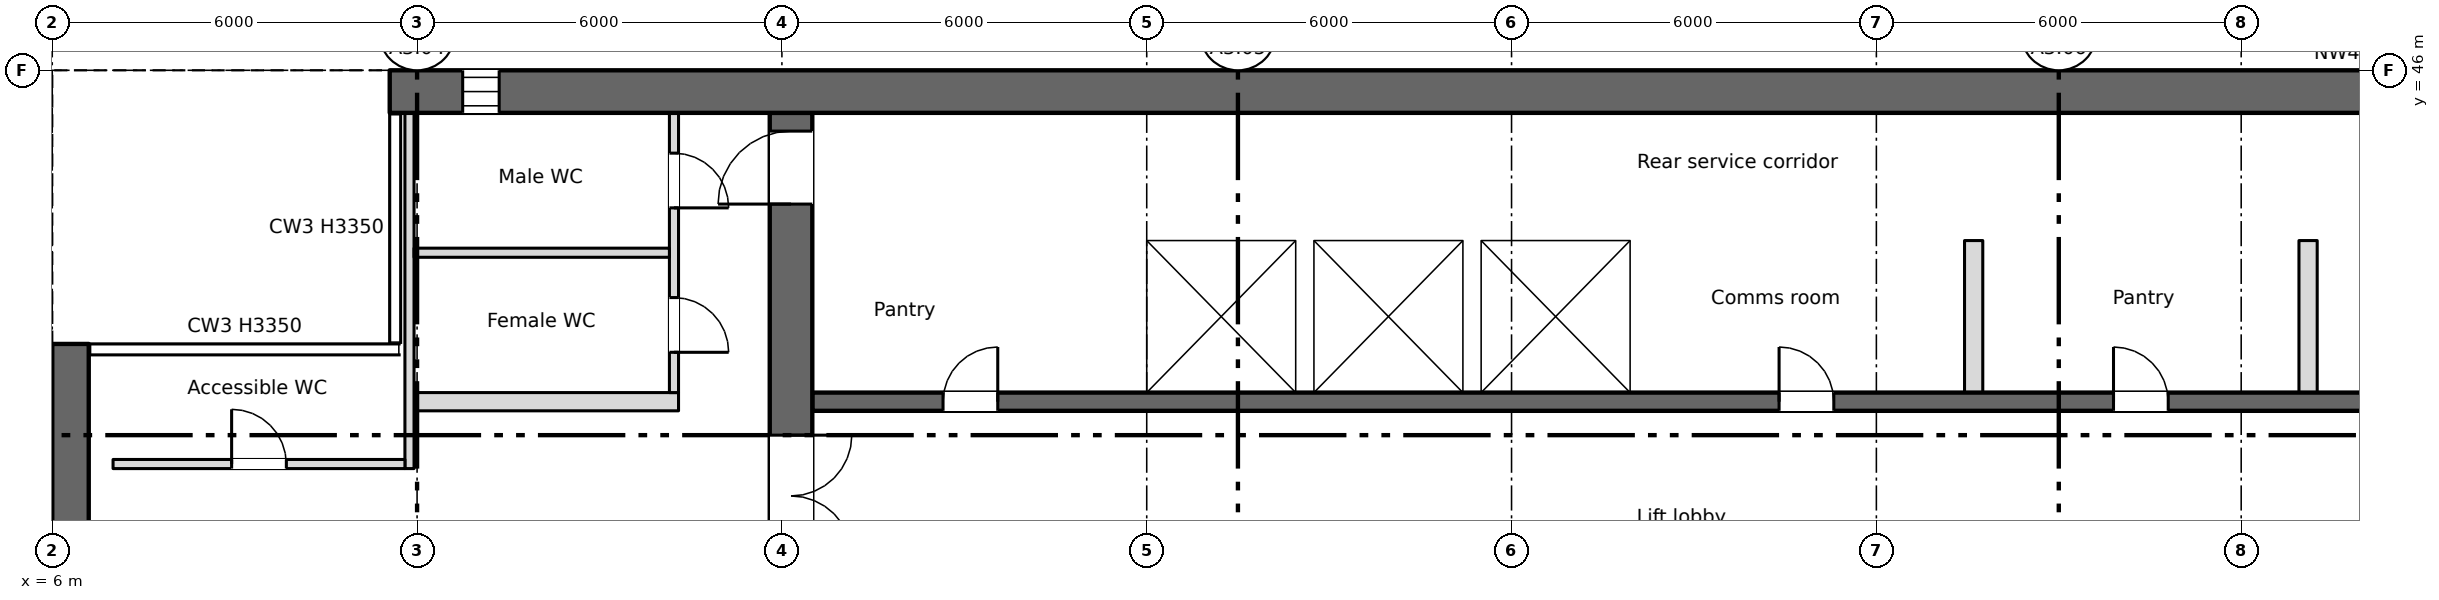
"""IFC4 building model, lengths in metres.
Left out: names, types, materials, properties, quantities, classifications, styles, units other than length and angle.
Written with IfcOpenShell. Run it as: python <this file> out.ifc"""

import sys

from ifc_helpers import new_model, si_unit, direction, frame, frame_2d, origin, place, context, subcontext, project, spatial, rectangle, extrude, element, fill, save


model = new_model("IFC4")
c1 = context("Model", 3, precision=1e-05, world=origin(), true_north=direction((0.0, 1.0)))
c2 = subcontext(c1, "Body", "Model", "MODEL_VIEW")
j1 = project(units=[si_unit("LENGTHUNIT", "METRE"), si_unit("PLANEANGLEUNIT", "RADIAN")], contexts=[c1])
p1 = place(None, origin())
s1 = spatial("IfcSite", under=j1, at=p1, CompositionType="ELEMENT")
p2 = place(p1, origin())
s2 = spatial("IfcBuilding", under=s1, at=p2, CompositionType="ELEMENT")
p3 = place(p2, frame((0.0, 0.0, 200.5)))
s3 = spatial("IfcBuildingStorey", under=s2, at=p3, CompositionType="ELEMENT", Elevation=200.5)
p4 = place(p3, frame((6.3, 7.5, 0.0), z_axis=(0.0, 0.0, 1.0), x_axis=(0.0, 1.0, 0.0)))
e1 = element("IfcWall", 1, at=p4, inside=s3, PredefinedType="SHEAR", context=c2, shape_type="SweptSolid", body=[
    extrude(rectangle(XDim=34.0, YDim=0.6, at=frame_2d((17.0, 0.0))), origin(), (0.0, 0.0, 1.0), 3.35),
])
p5 = place(p4, frame((1.2, 0.0, 0.6)))
e2 = element("IfcOpeningElement", 2, at=p5, cuts=e1, PredefinedType="OPENING", context=c2, shape_type="SweptSolid", body=[
    extrude(rectangle(XDim=0.6, YDim=2.4, at=frame_2d((0.3, 1.2))), frame((0.0, 0.31, 0.0), z_axis=(0.0, -1.0, 0.0), x_axis=(1.0, 0.0, 0.0)), (0.0, 0.0, 1.0), 0.62),
])
p6 = place(p4, frame((7.2, 0.0, 0.6)))
e3 = element("IfcOpeningElement", 3, at=p6, cuts=e1, PredefinedType="OPENING", context=c2, shape_type="SweptSolid", body=[
    extrude(rectangle(XDim=0.6, YDim=2.4, at=frame_2d((0.3, 1.2))), frame((0.0, 0.31, 0.0), z_axis=(0.0, -1.0, 0.0), x_axis=(1.0, 0.0, 0.0)), (0.0, 0.0, 1.0), 0.62),
])
p7 = place(p4, frame((13.2, 0.0, 0.6)))
e4 = element("IfcOpeningElement", 4, at=p7, cuts=e1, PredefinedType="OPENING", context=c2, shape_type="SweptSolid", body=[
    extrude(rectangle(XDim=0.6, YDim=2.4, at=frame_2d((0.3, 1.2))), frame((0.0, 0.31, 0.0), z_axis=(0.0, -1.0, 0.0), x_axis=(1.0, 0.0, 0.0)), (0.0, 0.0, 1.0), 0.62),
])
p8 = place(p4, frame((19.2, 0.0, 0.6)))
e5 = element("IfcOpeningElement", 5, at=p8, cuts=e1, PredefinedType="OPENING", context=c2, shape_type="SweptSolid", body=[
    extrude(rectangle(XDim=0.6, YDim=2.4, at=frame_2d((0.3, 1.2))), frame((0.0, 0.31, 0.0), z_axis=(0.0, -1.0, 0.0), x_axis=(1.0, 0.0, 0.0)), (0.0, 0.0, 1.0), 0.62),
])
p9 = place(p3, frame((11.55, 45.65, 0.0), z_axis=(0.0, 0.0, 1.0), x_axis=(1.0, 0.0, 0.0)))
e6 = element("IfcWall", 6, at=p9, inside=s3, PredefinedType="SHEAR", context=c2, shape_type="SweptSolid", body=[
    extrude(rectangle(XDim=54.9, YDim=0.7, at=frame_2d((27.45, 0.0))), origin(), (0.0, 0.0, 1.0), 3.35),
])
p10 = place(p9, frame((1.2, 0.0, 0.6)))
e7 = element("IfcOpeningElement", 7, at=p10, cuts=e6, PredefinedType="OPENING", context=c2, shape_type="SweptSolid", body=[
    extrude(rectangle(XDim=0.6, YDim=2.4, at=frame_2d((0.3, 1.2))), frame((0.0, 0.36, 0.0), z_axis=(0.0, -1.0, 0.0), x_axis=(1.0, 0.0, 0.0)), (0.0, 0.0, 1.0), 0.72),
])
p11 = place(p3, frame((6.8, 28.4, 0.0), z_axis=(0.0, 0.0, 1.0), x_axis=(0.0, 1.0, 0.0)))
e8 = element("IfcWall", 8, at=p11, inside=s3, PredefinedType="SHEAR", context=c2, shape_type="SweptSolid", body=[
    extrude(rectangle(XDim=12.85, YDim=0.4, at=frame_2d((6.425, 0.0))), origin(), (0.0, 0.0, 1.0), 3.35),
])
p12 = place(p3, frame((18.15, 28.4, 0.0), z_axis=(0.0, 0.0, 1.0), x_axis=(0.0, 1.0, 0.0)))
e9 = element("IfcWall", 9, at=p12, inside=s3, PredefinedType="SHEAR", context=c2, shape_type="SweptSolid", body=[
    extrude(rectangle(XDim=16.9, YDim=0.7, at=frame_2d((8.45, 0.0))), origin(), (0.0, 0.0, 1.0), 3.35),
])
p13 = place(p12, frame((9.6, 0.0, 0.0)))
e10 = element("IfcOpeningElement", 10, at=p13, cuts=e9, PredefinedType="OPENING", context=c2, shape_type="SweptSolid", body=[
    extrude(rectangle(XDim=2.0, YDim=2.1, at=frame_2d((1.0, 1.05))), frame((0.0, 0.36, 0.0), z_axis=(0.0, -1.0, 0.0), x_axis=(1.0, 0.0, 0.0)), (0.0, 0.0, 1.0), 0.72),
])
p14 = place(p12, frame((15.4, 0.0, 0.0)))
e11 = element("IfcOpeningElement", 11, at=p14, cuts=e9, PredefinedType="OPENING", context=c2, shape_type="SweptSolid", body=[
    extrude(rectangle(XDim=1.2, YDim=2.1, at=frame_2d((0.6, 1.05))), frame((0.0, 0.36, 0.0), z_axis=(0.0, -1.0, 0.0), x_axis=(1.0, 0.0, 0.0)), (0.0, 0.0, 1.0), 0.72),
])
p15 = place(p3, frame((18.5, 40.55, 0.0), z_axis=(0.0, 0.0, 1.0), x_axis=(1.0, 0.0, 0.0)))
e12 = element("IfcWall", 12, at=p15, inside=s3, PredefinedType="SHEAR", context=c2, shape_type="SweptSolid", body=[
    extrude(rectangle(XDim=41.0, YDim=0.3, at=frame_2d((20.5, 0.0))), origin(), (0.0, 0.0, 1.0), 3.35),
])
p16 = place(p15, frame((2.15, 0.0, 0.0)))
e13 = element("IfcOpeningElement", 13, at=p16, cuts=e12, PredefinedType="OPENING", context=c2, shape_type="SweptSolid", body=[
    extrude(rectangle(XDim=0.9, YDim=2.1, at=frame_2d((0.45, 1.05))), frame((0.0, 0.16, 0.0), z_axis=(0.0, -1.0, 0.0), x_axis=(1.0, 0.0, 0.0)), (0.0, 0.0, 1.0), 0.32),
])
p17 = place(p15, frame((15.9, 0.0, 0.0)))
e14 = element("IfcOpeningElement", 14, at=p17, cuts=e12, PredefinedType="OPENING", context=c2, shape_type="SweptSolid", body=[
    extrude(rectangle(XDim=0.9, YDim=2.1, at=frame_2d((0.45, 1.05))), frame((0.0, 0.16, 0.0), z_axis=(0.0, -1.0, 0.0), x_axis=(1.0, 0.0, 0.0)), (0.0, 0.0, 1.0), 0.32),
])
p18 = place(p15, frame((21.4, 0.0, 0.0)))
e15 = element("IfcOpeningElement", 15, at=p18, cuts=e12, PredefinedType="OPENING", context=c2, shape_type="SweptSolid", body=[
    extrude(rectangle(XDim=0.9, YDim=2.1, at=frame_2d((0.45, 1.05))), frame((0.0, 0.16, 0.0), z_axis=(0.0, -1.0, 0.0), x_axis=(1.0, 0.0, 0.0)), (0.0, 0.0, 1.0), 0.32),
])
p19 = place(p15, frame((26.9, 0.0, 0.0)))
e16 = element("IfcOpeningElement", 16, at=p19, cuts=e12, PredefinedType="OPENING", context=c2, shape_type="SweptSolid", body=[
    extrude(rectangle(XDim=0.9, YDim=2.1, at=frame_2d((0.45, 1.05))), frame((0.0, 0.16, 0.0), z_axis=(0.0, -1.0, 0.0), x_axis=(1.0, 0.0, 0.0)), (0.0, 0.0, 1.0), 0.32),
])
p20 = place(p15, frame((6.175, 0.0, 0.0)))
e17 = element("IfcOpeningElement", 17, at=p20, cuts=e12, PredefinedType="OPENING", context=c2, shape_type="SweptSolid", body=[
    extrude(rectangle(XDim=1.1, YDim=2.1, at=frame_2d((0.55, 1.05))), frame((0.0, 0.16, 0.0), z_axis=(0.0, -1.0, 0.0), x_axis=(1.0, 0.0, 0.0)), (0.0, 0.0, 1.0), 0.32),
])
p21 = place(p15, frame((8.925, 0.0, 0.0)))
e18 = element("IfcOpeningElement", 18, at=p21, cuts=e12, PredefinedType="OPENING", context=c2, shape_type="SweptSolid", body=[
    extrude(rectangle(XDim=1.1, YDim=2.1, at=frame_2d((0.55, 1.05))), frame((0.0, 0.16, 0.0), z_axis=(0.0, -1.0, 0.0), x_axis=(1.0, 0.0, 0.0)), (0.0, 0.0, 1.0), 0.32),
])
p22 = place(p15, frame((11.675, 0.0, 0.0)))
e19 = element("IfcOpeningElement", 19, at=p22, cuts=e12, PredefinedType="OPENING", context=c2, shape_type="SweptSolid", body=[
    extrude(rectangle(XDim=1.1, YDim=2.1, at=frame_2d((0.55, 1.05))), frame((0.0, 0.16, 0.0), z_axis=(0.0, -1.0, 0.0), x_axis=(1.0, 0.0, 0.0)), (0.0, 0.0, 1.0), 0.32),
])
p23 = place(p15, frame((30.925, 0.0, 0.0)))
e20 = element("IfcOpeningElement", 20, at=p23, cuts=e12, PredefinedType="OPENING", context=c2, shape_type="SweptSolid", body=[
    extrude(rectangle(XDim=1.1, YDim=2.1, at=frame_2d((0.55, 1.05))), frame((0.0, 0.16, 0.0), z_axis=(0.0, -1.0, 0.0), x_axis=(1.0, 0.0, 0.0)), (0.0, 0.0, 1.0), 0.32),
])
p24 = place(p15, frame((33.675, 0.0, 0.0)))
e21 = element("IfcOpeningElement", 21, at=p24, cuts=e12, PredefinedType="OPENING", context=c2, shape_type="SweptSolid", body=[
    extrude(rectangle(XDim=1.1, YDim=2.1, at=frame_2d((0.55, 1.05))), frame((0.0, 0.16, 0.0), z_axis=(0.0, -1.0, 0.0), x_axis=(1.0, 0.0, 0.0)), (0.0, 0.0, 1.0), 0.32),
])
p25 = place(p15, frame((36.375, 0.0, 0.0)))
e22 = element("IfcOpeningElement", 22, at=p25, cuts=e12, PredefinedType="OPENING", context=c2, shape_type="SweptSolid", body=[
    extrude(rectangle(XDim=1.2, YDim=2.1, at=frame_2d((0.6, 1.05))), frame((0.0, 0.16, 0.0), z_axis=(0.0, -1.0, 0.0), x_axis=(1.0, 0.0, 0.0)), (0.0, 0.0, 1.0), 0.32),
])
p26 = place(p15, frame((39.15, 0.0, 0.0)))
e23 = element("IfcOpeningElement", 23, at=p26, cuts=e12, PredefinedType="OPENING", context=c2, shape_type="SweptSolid", body=[
    extrude(rectangle(XDim=1.2, YDim=2.1, at=frame_2d((0.6, 1.05))), frame((0.0, 0.16, 0.0), z_axis=(0.0, -1.0, 0.0), x_axis=(1.0, 0.0, 0.0)), (0.0, 0.0, 1.0), 0.32),
])
p27 = place(p3, frame((18.5, 43.35, 0.0), z_axis=(0.0, 0.0, 1.0), x_axis=(1.0, 0.0, 0.0)))
e24 = element("IfcWall", 24, at=p27, inside=s3, PredefinedType="SHEAR", context=c2, shape_type="SweptSolid", body=[
    extrude(rectangle(XDim=41.0, YDim=0.3, at=frame_2d((20.5, 0.0))), origin(), (0.0, 0.0, 1.0), 3.35),
])
p28 = place(p3, frame((11.95, 40.55, 0.0), z_axis=(0.0, 0.0, 1.0), x_axis=(1.0, 0.0, 0.0)))
e25 = element("IfcWall", 25, at=p28, inside=s3, PredefinedType="PARTITIONING", context=c2, shape_type="SweptSolid", body=[
    extrude(rectangle(XDim=4.35, YDim=0.3, at=frame_2d((2.175, 0.0))), origin(), (0.0, 0.0, 1.0), 3.35),
])
for number, where, z_axis, x_axis in (
    (26, (23.85, 40.7, 0.0), (0.0, 0.0, 1.0), (0.0, 1.0, 0.0)),
    (27, (26.6, 40.7, 0.0), (0.0, 0.0, 1.0), (0.0, 1.0, 0.0)),
    (28, (29.35, 40.7, 0.0), (0.0, 0.0, 1.0), (0.0, 1.0, 0.0)),
    (29, (32.1, 40.7, 0.0), (0.0, 0.0, 1.0), (0.0, 1.0, 0.0)),
):
    element("IfcWall", number, at=place(p3, frame(where, z_axis=z_axis, x_axis=x_axis)), inside=s3, PredefinedType="SHEAR", context=c2, shape_type="SweptSolid", body=[
        extrude(rectangle(XDim=2.5, YDim=0.3, at=frame_2d((1.25, 0.0))), origin(), (0.0, 0.0, 1.0), 3.35),
    ])
p29 = place(p3, frame((16.225, 45.3, 0.0), z_axis=(0.0, 0.0, 1.0), x_axis=(0.0, -1.0, 0.0)))
e30 = element("IfcWall", 30, at=p29, inside=s3, PredefinedType="PARTITIONING", context=c2, shape_type="SweptSolid", body=[
    extrude(rectangle(XDim=4.6, YDim=0.15, at=frame_2d((2.3, 0.0))), origin(), (0.0, 0.0, 1.0), 3.35),
])
p30 = place(p29, frame((3.038, 0.0, 0.0)))
e31 = element("IfcOpeningElement", 31, at=p30, cuts=e30, PredefinedType="OPENING", context=c2, shape_type="SweptSolid", body=[
    extrude(rectangle(XDim=0.9, YDim=2.1, at=frame_2d((0.45, 1.05))), frame((0.0, 0.085, 0.0), z_axis=(0.0, -1.0, 0.0), x_axis=(1.0, 0.0, 0.0)), (0.0, 0.0, 1.0), 0.17),
])
p31 = place(p29, frame((0.663, 0.0, 0.0)))
e32 = element("IfcOpeningElement", 32, at=p31, cuts=e30, PredefinedType="OPENING", context=c2, shape_type="SweptSolid", body=[
    extrude(rectangle(XDim=0.9, YDim=2.1, at=frame_2d((0.45, 1.05))), frame((0.0, 0.085, 0.0), z_axis=(0.0, -1.0, 0.0), x_axis=(1.0, 0.0, 0.0)), (0.0, 0.0, 1.0), 0.17),
])
p32 = place(p3, frame((11.875, 39.45, 0.0), z_axis=(0.0, 0.0, 1.0), x_axis=(0.0, 1.0, 0.0)))
e33 = element("IfcWall", 33, at=p32, inside=s3, PredefinedType="PARTITIONING", context=c2, shape_type="SweptSolid", body=[
    extrude(rectangle(XDim=5.85, YDim=0.15, at=frame_2d((2.925, 0.0))), origin(), (0.0, 0.0, 1.0), 3.35),
])
p33 = place(p3, frame((7.0, 39.525, 0.0), z_axis=(0.0, 0.0, 1.0), x_axis=(1.0, 0.0, 0.0)))
e34 = element("IfcWall", 34, at=p33, inside=s3, PredefinedType="PARTITIONING", context=c2, shape_type="SweptSolid", body=[
    extrude(rectangle(XDim=4.8, YDim=0.15, at=frame_2d((2.4, 0.0))), origin(), (0.0, 0.0, 1.0), 3.35),
])
p34 = place(p33, frame((1.95, 0.0, 0.0)))
e35 = element("IfcOpeningElement", 35, at=p34, cuts=e34, PredefinedType="OPENING", context=c2, shape_type="SweptSolid", body=[
    extrude(rectangle(XDim=0.9, YDim=2.1, at=frame_2d((0.45, 1.05))), frame((0.0, 0.085, 0.0), z_axis=(0.0, -1.0, 0.0), x_axis=(1.0, 0.0, 0.0)), (0.0, 0.0, 1.0), 0.17),
])
p35 = place(p3, frame((11.95, 43.0, 0.0), z_axis=(0.0, 0.0, 1.0), x_axis=(1.0, 0.0, 0.0)))
e36 = element("IfcWall", 36, at=p35, inside=s3, PredefinedType="PARTITIONING", context=c2, shape_type="SweptSolid", body=[
    extrude(rectangle(XDim=4.2, YDim=0.15, at=frame_2d((2.1, 0.0))), origin(), (0.0, 0.0, 1.0), 3.35),
])
for number, where, z_axis, x_axis in (
    (37, (37.6, 40.7, 0.0), (0.0, 0.0, 1.0), (0.0, 1.0, 0.0)),
    (38, (43.1, 40.7, 0.0), (0.0, 0.0, 1.0), (0.0, 1.0, 0.0)),
):
    element("IfcWall", number, at=place(p3, frame(where, z_axis=z_axis, x_axis=x_axis)), inside=s3, PredefinedType="PARTITIONING", context=c2, shape_type="SweptSolid", body=[
        extrude(rectangle(XDim=2.5, YDim=0.3, at=frame_2d((1.25, 0.0))), origin(), (0.0, 0.0, 1.0), 3.35),
    ])
p36 = place(p10, origin())
e39 = element("IfcWindow", 39, at=p36, inside=s3, PartitioningType="SINGLE_PANEL", PredefinedType="WINDOW", context=c2, shape_type="SweptSolid", body=[
    extrude(rectangle(XDim=0.6, YDim=2.4, at=frame_2d((0.3, 1.2))), frame((0.0, 0.03, 0.0), z_axis=(0.0, -1.0, 0.0), x_axis=(1.0, 0.0, 0.0)), (0.0, 0.0, 1.0), 0.06),
])
fill(e7, e39)
p37 = place(p34, origin())
e40 = element("IfcDoor", 40, at=p37, inside=s3, OperationType="SINGLE_SWING_LEFT", PredefinedType="DOOR", context=c2, shape_type="SweptSolid", body=[
    extrude(rectangle(XDim=0.9, YDim=2.1, at=frame_2d((0.45, 1.05))), frame((0.0, 0.025, 0.0), z_axis=(0.0, -1.0, 0.0), x_axis=(1.0, 0.0, 0.0)), (0.0, 0.0, 1.0), 0.05),
])
fill(e35, e40)
p38 = place(p30, origin())
e41 = element("IfcDoor", 41, at=p38, inside=s3, OperationType="SINGLE_SWING_RIGHT", PredefinedType="DOOR", context=c2, shape_type="SweptSolid", body=[
    extrude(rectangle(XDim=0.9, YDim=2.1, at=frame_2d((0.45, 1.05))), frame((0.0, 0.025, 0.0), z_axis=(0.0, -1.0, 0.0), x_axis=(1.0, 0.0, 0.0)), (0.0, 0.0, 1.0), 0.05),
])
fill(e31, e41)
p39 = place(p31, origin())
e42 = element("IfcDoor", 42, at=p39, inside=s3, OperationType="SINGLE_SWING_RIGHT", PredefinedType="DOOR", context=c2, shape_type="SweptSolid", body=[
    extrude(rectangle(XDim=0.9, YDim=2.1, at=frame_2d((0.45, 1.05))), frame((0.0, 0.025, 0.0), z_axis=(0.0, -1.0, 0.0), x_axis=(1.0, 0.0, 0.0)), (0.0, 0.0, 1.0), 0.05),
])
fill(e32, e42)
p40 = place(p16, origin())
e43 = element("IfcDoor", 43, at=p40, inside=s3, OperationType="SINGLE_SWING_RIGHT", PredefinedType="DOOR", context=c2, shape_type="SweptSolid", body=[
    extrude(rectangle(XDim=0.9, YDim=2.1, at=frame_2d((0.45, 1.05))), frame((0.0, 0.025, 0.0), z_axis=(0.0, -1.0, 0.0), x_axis=(1.0, 0.0, 0.0)), (0.0, 0.0, 1.0), 0.05),
])
fill(e13, e43)
p41 = place(p17, origin())
e44 = element("IfcDoor", 44, at=p41, inside=s3, OperationType="SINGLE_SWING_LEFT", PredefinedType="DOOR", context=c2, shape_type="SweptSolid", body=[
    extrude(rectangle(XDim=0.9, YDim=2.1, at=frame_2d((0.45, 1.05))), frame((0.0, 0.025, 0.0), z_axis=(0.0, -1.0, 0.0), x_axis=(1.0, 0.0, 0.0)), (0.0, 0.0, 1.0), 0.05),
])
fill(e14, e44)
p42 = place(p18, origin())
e45 = element("IfcDoor", 45, at=p42, inside=s3, OperationType="SINGLE_SWING_LEFT", PredefinedType="DOOR", context=c2, shape_type="SweptSolid", body=[
    extrude(rectangle(XDim=0.9, YDim=2.1, at=frame_2d((0.45, 1.05))), frame((0.0, 0.025, 0.0), z_axis=(0.0, -1.0, 0.0), x_axis=(1.0, 0.0, 0.0)), (0.0, 0.0, 1.0), 0.05),
])
fill(e15, e45)
p43 = place(p20, origin())
e46 = element("IfcDoor", 46, at=p43, inside=s3, OperationType="SLIDING_TO_LEFT", PredefinedType="DOOR", context=c2, shape_type="SweptSolid", body=[
    extrude(rectangle(XDim=1.1, YDim=2.1, at=frame_2d((0.55, 1.05))), frame((0.0, 0.025, 0.0), z_axis=(0.0, -1.0, 0.0), x_axis=(1.0, 0.0, 0.0)), (0.0, 0.0, 1.0), 0.05),
])
fill(e17, e46)
p44 = place(p21, origin())
e47 = element("IfcDoor", 47, at=p44, inside=s3, OperationType="SLIDING_TO_LEFT", PredefinedType="DOOR", context=c2, shape_type="SweptSolid", body=[
    extrude(rectangle(XDim=1.1, YDim=2.1, at=frame_2d((0.55, 1.05))), frame((0.0, 0.025, 0.0), z_axis=(0.0, -1.0, 0.0), x_axis=(1.0, 0.0, 0.0)), (0.0, 0.0, 1.0), 0.05),
])
fill(e18, e47)
p45 = place(p22, origin())
e48 = element("IfcDoor", 48, at=p45, inside=s3, OperationType="SLIDING_TO_LEFT", PredefinedType="DOOR", context=c2, shape_type="SweptSolid", body=[
    extrude(rectangle(XDim=1.1, YDim=2.1, at=frame_2d((0.55, 1.05))), frame((0.0, 0.025, 0.0), z_axis=(0.0, -1.0, 0.0), x_axis=(1.0, 0.0, 0.0)), (0.0, 0.0, 1.0), 0.05),
])
fill(e19, e48)
p46 = place(p13, origin())
e49 = element("IfcDoor", 49, at=p46, inside=s3, OperationType="DOUBLE_DOOR_SINGLE_SWING", PredefinedType="DOOR", context=c2, shape_type="SweptSolid", body=[
    extrude(rectangle(XDim=2.0, YDim=2.1, at=frame_2d((1.0, 1.05))), frame((0.0, 0.025, 0.0), z_axis=(0.0, -1.0, 0.0), x_axis=(1.0, 0.0, 0.0)), (0.0, 0.0, 1.0), 0.05),
])
fill(e10, e49)
p47 = place(p14, origin())
e50 = element("IfcDoor", 50, at=p47, inside=s3, OperationType="SINGLE_SWING_LEFT", PredefinedType="DOOR", context=c2, shape_type="SweptSolid", body=[
    extrude(rectangle(XDim=1.2, YDim=2.1, at=frame_2d((0.6, 1.05))), frame((0.0, 0.025, 0.0), z_axis=(0.0, -1.0, 0.0), x_axis=(1.0, 0.0, 0.0)), (0.0, 0.0, 1.0), 0.05),
])
fill(e11, e50)
save(model, sys.argv[1])
